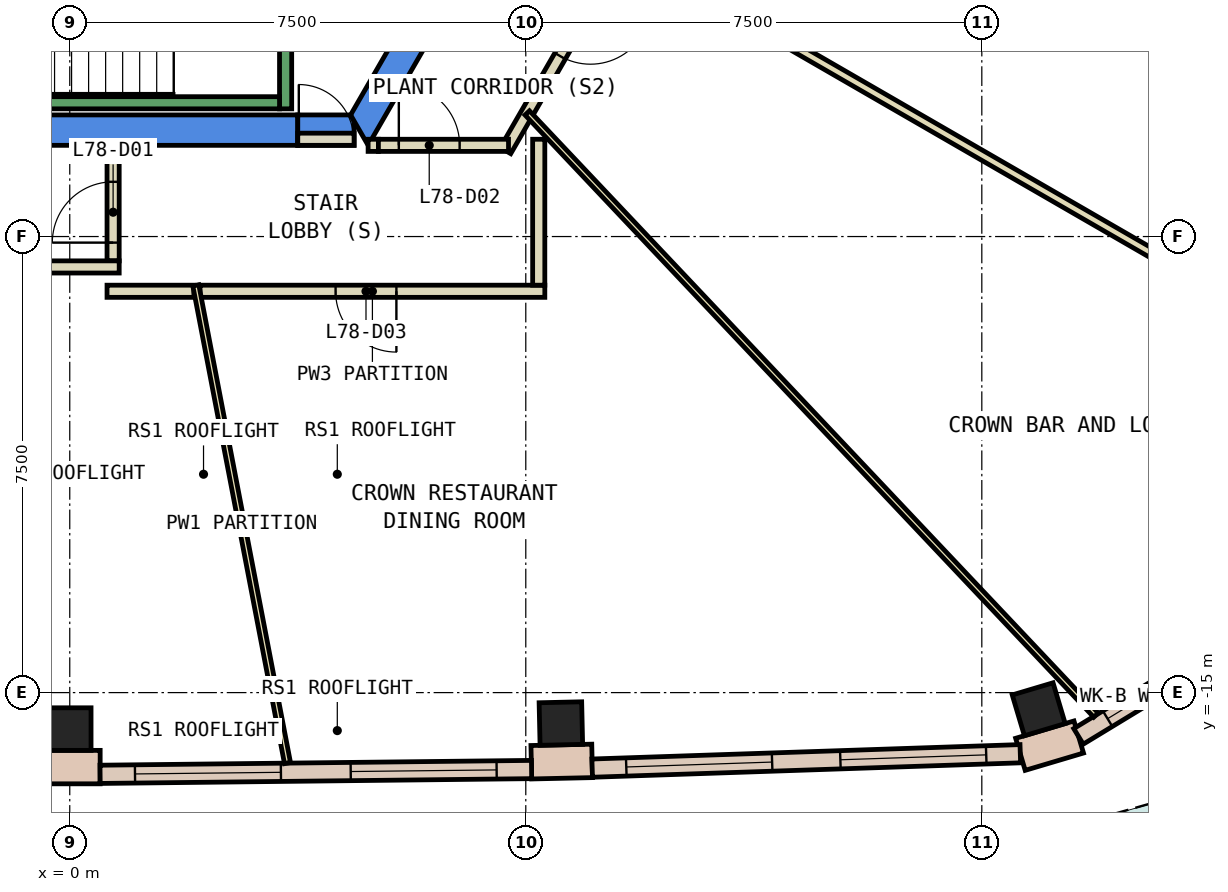
"""IFC4 building model, lengths in metres.
Left out: names, types, materials, properties, quantities, classifications, styles, units other than length and angle.
Written with IfcOpenShell. Run it as: python <this file> out.ifc"""

import sys

from ifc_helpers import new_model, si_unit, direction, frame, frame_2d, origin, origin_2d, place, context, subcontext, project, spatial, polyline, rectangle, outline, extrude, element, fill, save


model = new_model("IFC4")
c1 = context("Model", 3, precision=1e-05, world=origin(), true_north=direction((0.0, 1.0)))
c2 = subcontext(c1, "Body", "Model", "MODEL_VIEW")
j1 = project(units=[si_unit("LENGTHUNIT", "METRE"), si_unit("PLANEANGLEUNIT", "RADIAN")], contexts=[c1])
p1 = place(None, origin())
s1 = spatial("IfcSite", under=j1, at=p1, CompositionType="ELEMENT")
p2 = place(p1, origin())
s2 = spatial("IfcBuilding", under=s1, at=p2, CompositionType="ELEMENT")
p3 = place(p2, frame((0.0, 0.0, 331.4)))
s3 = spatial("IfcBuildingStorey", under=s2, at=p3, CompositionType="ELEMENT", Elevation=331.4)
for number, where, z_axis, x_axis in (
    (1, (0.0, -15.6, 0.0), (0.0, 0.0, 1.0), (1.0, 0.0, 0.0)),
    (2, (8.077, -15.509, 0.0), (0.0, 0.0, 1.0), (1.0, 0.022, 0.0)),
    (3, (15.936, -15.274, 0.0), (0.0, 0.0, 1.0), (0.958, 0.286, 0.0)),
):
    element("IfcColumn", number, at=place(p3, frame(where, z_axis=z_axis, x_axis=x_axis)), inside=s3, PredefinedType="COLUMN", context=c2, shape_type="SweptSolid", body=[
        extrude(rectangle(XDim=0.7, YDim=0.7, at=origin_2d()), origin(), (0.0, 0.0, 1.0), 4.15),
    ])
p4 = place(p3, frame((0.0, 0.0, -0.45)))
e4 = element("IfcWall", 4, at=p4, inside=s3, PredefinedType="SHEAR", context=c2, shape_type="SweptSolid", body=[
    extrude(outline(polyline([(3.75, -6.0), (3.75, -5.5), (-4.619, -5.5), (-4.907, -6.0), (3.75, -6.0)])), origin(), (0.0, 0.0, 1.0), 4.6),
])
p5 = place(p3, frame((0.0, 0.0, 3.6)))
e5 = element("IfcWall", 5, at=p5, inside=s3, PredefinedType="SHEAR", context=c2, shape_type="SweptSolid", body=[
    extrude(outline(polyline([(4.676, -6.0), (4.676, -5.6), (4.619, -5.5), (3.75, -5.5), (3.75, -6.0), (4.676, -6.0)])), origin(), (0.0, 0.0, 1.0), 0.55),
])
p6 = place(p3, frame((0.0, 0.0, -0.45)))
e6 = element("IfcWall", 6, at=p6, inside=s3, PredefinedType="SHEAR", context=c2, shape_type="SweptSolid", body=[
    extrude(outline(polyline([(4.907, -6.0), (9.815, 2.5), (9.238, 2.5), (4.619, -5.5), (4.907, -6.0)])), origin(), (0.0, 0.0, 1.0), 4.6),
])
p7 = place(p3, frame((-0.5, -16.225, 0.0), z_axis=(0.0, 0.0, 1.0), x_axis=(1.0, 0.0, 0.0)))
e7 = element("IfcWall", 7, at=p7, inside=s3, PredefinedType="STANDARD", context=c2, shape_type="SweptSolid", body=[
    extrude(rectangle(XDim=1.0, YDim=0.55, at=frame_2d((0.5, 0.0))), origin(), (0.0, 0.0, 1.0), 4.15),
])
p8 = place(p3, frame((7.591, -16.145, 0.0), z_axis=(0.0, 0.0, 1.0), x_axis=(0.999758688564, 0.021967353997, 0.0)))
e8 = element("IfcWall", 8, at=p8, inside=s3, PredefinedType="STANDARD", context=c2, shape_type="SweptSolid", body=[
    extrude(rectangle(XDim=1.0, YDim=0.55, at=frame_2d((0.5, 0.0))), origin(), (0.0, 0.0, 1.0), 4.15),
])
p9 = place(p3, frame((15.635, -16.015, 0.0), z_axis=(0.0, 0.0, 1.0), x_axis=(0.958588587629, 0.284794521834, 0.0)))
e9 = element("IfcWall", 9, at=p9, inside=s3, PredefinedType="STANDARD", context=c2, shape_type="SweptSolid", body=[
    extrude(rectangle(XDim=1.0, YDim=0.55, at=frame_2d((0.5, 0.0))), origin(), (0.0, 0.0, 1.0), 4.15),
])
p10 = place(p3, frame((0.499, -16.344, 0.0), z_axis=(0.0, 0.0, 1.0), x_axis=(0.999937873213, 0.011146735624, 0.0)))
e10 = element("IfcWall", 10, at=p10, inside=s3, PredefinedType="STANDARD", context=c2, shape_type="SweptSolid", body=[
    extrude(rectangle(XDim=7.096, YDim=0.3, at=frame_2d((3.548, 0.0))), origin(), (0.0, 0.0, 1.0), 4.15),
])
p11 = place(p10, frame((0.574, 0.0, 0.9)))
e11 = element("IfcOpeningElement", 11, at=p11, cuts=e10, PredefinedType="OPENING", context=c2, shape_type="SweptSolid", body=[
    extrude(rectangle(XDim=2.4, YDim=3.0, at=frame_2d((1.2, 1.5))), frame((0.0, 0.16, 0.0), z_axis=(0.0, -1.0, 0.0), x_axis=(1.0, 0.0, 0.0)), (0.0, 0.0, 1.0), 0.32),
])
p12 = place(p10, frame((4.122, 0.0, 0.9)))
e12 = element("IfcOpeningElement", 12, at=p12, cuts=e10, PredefinedType="OPENING", context=c2, shape_type="SweptSolid", body=[
    extrude(rectangle(XDim=2.4, YDim=3.0, at=frame_2d((1.2, 1.5))), frame((0.0, 0.16, 0.0), z_axis=(0.0, -1.0, 0.0), x_axis=(1.0, 0.0, 0.0)), (0.0, 0.0, 1.0), 0.32),
])
p13 = place(p3, frame((8.592, -16.242, 0.0), z_axis=(0.0, 0.0, 1.0), x_axis=(0.999433696929, 0.033649449366, 0.0)))
e13 = element("IfcWall", 13, at=p13, inside=s3, PredefinedType="STANDARD", context=c2, shape_type="SweptSolid", body=[
    extrude(rectangle(XDim=7.045, YDim=0.3, at=frame_2d((3.522, 0.0))), origin(), (0.0, 0.0, 1.0), 4.15),
])
p14 = place(p13, frame((0.561, 0.0, 0.9)))
e14 = element("IfcOpeningElement", 14, at=p14, cuts=e13, PredefinedType="OPENING", context=c2, shape_type="SweptSolid", body=[
    extrude(rectangle(XDim=2.4, YDim=3.0, at=frame_2d((1.2, 1.5))), frame((0.0, 0.16, 0.0), z_axis=(0.0, -1.0, 0.0), x_axis=(1.0, 0.0, 0.0)), (0.0, 0.0, 1.0), 0.32),
])
p15 = place(p13, frame((4.084, 0.0, 0.9)))
e15 = element("IfcOpeningElement", 15, at=p15, cuts=e13, PredefinedType="OPENING", context=c2, shape_type="SweptSolid", body=[
    extrude(rectangle(XDim=2.4, YDim=3.0, at=frame_2d((1.2, 1.5))), frame((0.0, 0.16, 0.0), z_axis=(0.0, -1.0, 0.0), x_axis=(1.0, 0.0, 0.0)), (0.0, 0.0, 1.0), 0.32),
])
p16 = place(p3, frame((16.59, -15.72, 0.0), z_axis=(0.0, 0.0, 1.0), x_axis=(0.854607095238, 0.519275180197, 0.0)))
e16 = element("IfcWall", 16, at=p16, inside=s3, PredefinedType="STANDARD", context=c2, shape_type="SweptSolid", body=[
    extrude(rectangle(XDim=5.04, YDim=0.3, at=frame_2d((2.52, 0.0))), origin(), (0.0, 0.0, 1.0), 4.15),
])
p17 = place(p16, frame((0.56, 0.0, 0.9)))
e17 = element("IfcOpeningElement", 17, at=p17, cuts=e16, PredefinedType="OPENING", context=c2, shape_type="SweptSolid", body=[
    extrude(rectangle(XDim=1.4, YDim=3.0, at=frame_2d((0.7, 1.5))), frame((0.0, 0.16, 0.0), z_axis=(0.0, -1.0, 0.0), x_axis=(1.0, 0.0, 0.0)), (0.0, 0.0, 1.0), 0.32),
])
p18 = place(p16, frame((3.08, 0.0, 0.9)))
e18 = element("IfcOpeningElement", 18, at=p18, cuts=e16, PredefinedType="OPENING", context=c2, shape_type="SweptSolid", body=[
    extrude(rectangle(XDim=1.4, YDim=3.0, at=frame_2d((0.7, 1.5))), frame((0.0, 0.16, 0.0), z_axis=(0.0, -1.0, 0.0), x_axis=(1.0, 0.0, 0.0)), (0.0, 0.0, 1.0), 0.32),
])
p19 = place(p3, frame((0.713, -7.9, 0.0), z_axis=(0.0, 0.0, 1.0), x_axis=(0.0, 1.0, 0.0)))
e19 = element("IfcWall", 19, at=p19, inside=s3, PredefinedType="PARTITIONING", context=c2, shape_type="SweptSolid", body=[
    extrude(rectangle(XDim=1.9, YDim=0.2, at=frame_2d((0.95, 0.0))), origin(), (0.0, 0.0, 1.0), 4.15),
])
p20 = place(p19, frame((0.3, 0.0, 0.0)))
e20 = element("IfcOpeningElement", 20, at=p20, cuts=e19, PredefinedType="OPENING", context=c2, shape_type="SweptSolid", body=[
    extrude(rectangle(XDim=1.0, YDim=2.1, at=frame_2d((0.5, 1.05))), frame((0.0, 0.11, 0.0), z_axis=(0.0, -1.0, 0.0), x_axis=(1.0, 0.0, 0.0)), (0.0, 0.0, 1.0), 0.22),
])
p21 = place(p3, frame((4.907, -6.0, 0.0), z_axis=(0.0, 0.0, 1.0), x_axis=(1.0, 0.0, 0.0)))
e21 = element("IfcWall", 21, at=p21, inside=s3, PredefinedType="PARTITIONING", context=c2, shape_type="SweptSolid", body=[
    extrude(rectangle(XDim=0.169, YDim=0.2, at=frame_2d((0.084, 0.0))), origin(), (0.0, 0.0, 1.0), 2.4),
])
p22 = place(p3, frame((7.813, -8.4, 0.0), z_axis=(0.0, 0.0, 1.0), x_axis=(-1.0, 0.0, 0.0)))
e22 = element("IfcWall", 22, at=p22, inside=s3, PredefinedType="PARTITIONING", context=c2, shape_type="SweptSolid", body=[
    extrude(rectangle(XDim=5.671, YDim=0.2, at=frame_2d((2.835, 0.0))), origin(), (0.0, 0.0, 1.0), 4.15),
])
p23 = place(p22, frame((2.441, 0.0, 0.0)))
e23 = element("IfcOpeningElement", 23, at=p23, cuts=e22, PredefinedType="OPENING", context=c2, shape_type="SweptSolid", body=[
    extrude(rectangle(XDim=1.0, YDim=2.1, at=frame_2d((0.5, 1.05))), frame((0.0, 0.11, 0.0), z_axis=(0.0, -1.0, 0.0), x_axis=(1.0, 0.0, 0.0)), (0.0, 0.0, 1.0), 0.22),
])
p24 = place(p3, frame((7.713, -5.9, 0.0), z_axis=(0.0, 0.0, 1.0), x_axis=(0.0, -1.0, 0.0)))
e24 = element("IfcWall", 24, at=p24, inside=s3, PredefinedType="PARTITIONING", context=c2, shape_type="SweptSolid", body=[
    extrude(rectangle(XDim=2.4, YDim=0.2, at=frame_2d((1.2, 0.0))), origin(), (0.0, 0.0, 1.0), 4.15),
])
p25 = place(p3, frame((2.042, -8.4, 0.0), z_axis=(0.0, 0.0, 1.0), x_axis=(-1.0, 0.0, 0.0)))
e25 = element("IfcWall", 25, at=p25, inside=s3, PredefinedType="PARTITIONING", context=c2, shape_type="SweptSolid", body=[
    extrude(rectangle(XDim=1.429, YDim=0.2, at=frame_2d((0.714, 0.0))), origin(), (0.0, 0.0, 1.0), 4.15),
])
p26 = place(p3, frame((0.813, -8.0, 0.0), z_axis=(0.0, 0.0, 1.0), x_axis=(-1.0, 0.0, 0.0)))
e26 = element("IfcWall", 26, at=p26, inside=s3, PredefinedType="PARTITIONING", context=c2, shape_type="SweptSolid", body=[
    extrude(rectangle(XDim=6.975, YDim=0.2, at=frame_2d((3.488, 0.0))), origin(), (0.0, 0.0, 1.0), 4.15),
])
p27 = place(p26, frame((5.825, 0.0, 0.0)))
e27 = element("IfcOpeningElement", 27, at=p27, cuts=e26, PredefinedType="OPENING", context=c2, shape_type="SweptSolid", body=[
    extrude(rectangle(XDim=1.0, YDim=2.1, at=frame_2d((0.5, 1.05))), frame((0.0, 0.11, 0.0), z_axis=(0.0, -1.0, 0.0), x_axis=(1.0, 0.0, 0.0)), (0.0, 0.0, 1.0), 0.22),
])
p28 = place(p3, frame((9.106, -2.728, 0.0), z_axis=(0.0, 0.0, 1.0), x_axis=(-0.500132879116, -0.865948672398, 0.0)))
e28 = element("IfcWall", 28, at=p28, inside=s3, PredefinedType="PARTITIONING", context=c2, shape_type="SweptSolid", body=[
    extrude(rectangle(XDim=3.879, YDim=0.2, at=frame_2d((1.939, 0.0))), origin(), (0.0, 0.0, 1.0), 4.15),
])
p29 = place(p28, frame((1.083, 0.0, 0.0)))
e29 = element("IfcOpeningElement", 29, at=p29, cuts=e28, PredefinedType="OPENING", context=c2, shape_type="SweptSolid", body=[
    extrude(rectangle(XDim=1.0, YDim=2.1, at=frame_2d((0.5, 1.05))), frame((0.0, 0.11, 0.0), z_axis=(0.0, -1.0, 0.0), x_axis=(1.0, 0.0, 0.0)), (0.0, 0.0, 1.0), 0.22),
])
p30 = place(p3, frame((3.581, -16.159, 0.0), z_axis=(0.0, 0.0, 1.0), x_axis=(-0.188498774051, 0.982073425046, 0.0)))
e30 = element("IfcWall", 30, at=p30, inside=s3, PredefinedType="PARTITIONING", context=c2, shape_type="SweptSolid", body=[
    extrude(rectangle(XDim=8.0, YDim=0.1, at=frame_2d((4.0, 0.0))), origin(), (0.0, 0.0, 1.0), 4.15),
])
p31 = place(p3, frame((7.524, -5.467, 0.0), z_axis=(0.0, 0.0, 1.0), x_axis=(0.686666158826, -0.726972892427, 0.0)))
e31 = element("IfcWall", 31, at=p31, inside=s3, PredefinedType="PARTITIONING", context=c2, shape_type="SweptSolid", body=[
    extrude(rectangle(XDim=13.622, YDim=0.1, at=frame_2d((6.811, 0.0))), origin(), (0.0, 0.0, 1.0), 4.15),
])
p32 = place(p3, frame((9.006, -2.7, 0.0), z_axis=(0.0, 0.0, 1.0), x_axis=(0.865999449672, -0.500044951147, 0.0)))
e32 = element("IfcWall", 32, at=p32, inside=s3, PredefinedType="PARTITIONING", context=c2, shape_type="SweptSolid", body=[
    extrude(rectangle(XDim=14.635, YDim=0.15, at=frame_2d((7.317, 0.0))), origin(), (0.0, 0.0, 1.0), 4.15),
])
p33 = place(p3, frame((3.75, -5.9, 0.0), z_axis=(0.0, 0.0, 1.0), x_axis=(1.0, 0.0, 0.0)))
e33 = element("IfcWall", 33, at=p33, inside=s3, PredefinedType="PARTITIONING", context=c2, shape_type="SweptSolid", body=[
    extrude(rectangle(XDim=0.926, YDim=0.2, at=frame_2d((0.463, 0.0))), origin(), (0.0, 0.0, 1.0), 2.4),
])
p34 = place(p33, frame((0.017, 0.0, 0.0)))
e34 = element("IfcOpeningElement", 34, at=p34, cuts=e33, PredefinedType="OPENING", context=c2, shape_type="SweptSolid", body=[
    extrude(rectangle(XDim=0.9, YDim=2.1, at=frame_2d((0.45, 1.05))), frame((0.0, 0.11, 0.0), z_axis=(0.0, -1.0, 0.0), x_axis=(1.0, 0.0, 0.0)), (0.0, 0.0, 1.0), 0.22),
])
p35 = place(p3, frame((5.076, -6.0, 0.0), z_axis=(0.0, 0.0, 1.0), x_axis=(1.0, 0.0, 0.0)))
e35 = element("IfcWall", 35, at=p35, inside=s3, PredefinedType="PARTITIONING", context=c2, shape_type="SweptSolid", body=[
    extrude(rectangle(XDim=2.14, YDim=0.2, at=frame_2d((1.07, 0.0))), origin(), (0.0, 0.0, 1.0), 4.15),
])
p36 = place(p35, frame((0.336, 0.0, 0.0)))
e36 = element("IfcOpeningElement", 36, at=p36, cuts=e35, PredefinedType="OPENING", context=c2, shape_type="SweptSolid", body=[
    extrude(rectangle(XDim=1.0, YDim=2.1, at=frame_2d((0.5, 1.05))), frame((0.0, 0.11, 0.0), z_axis=(0.0, -1.0, 0.0), x_axis=(1.0, 0.0, 0.0)), (0.0, 0.0, 1.0), 0.22),
])
p37 = place(p3, frame((3.55, -2.667, 0.0), z_axis=(0.0, 0.0, 1.0), x_axis=(0.0, -1.0, 0.0)))
e37 = element("IfcWall", 37, at=p37, inside=s3, PredefinedType="STANDARD", context=c2, shape_type="SweptSolid", body=[
    extrude(rectangle(XDim=2.733, YDim=0.2, at=frame_2d((1.366, 0.0))), origin(), (0.0, 0.0, 1.0), 4.15),
])
p38 = place(p3, frame((-3.45, -5.3, 0.0), z_axis=(0.0, 0.0, 1.0), x_axis=(1.0, 0.0, 0.0)))
e38 = element("IfcWall", 38, at=p38, inside=s3, PredefinedType="STANDARD", context=c2, shape_type="SweptSolid", body=[
    extrude(rectangle(XDim=6.9, YDim=0.2, at=frame_2d((3.45, 0.0))), origin(), (0.0, 0.0, 1.0), 4.15),
])
p39 = place(p11, origin())
e39 = element("IfcWindow", 39, at=p39, inside=s3, PartitioningType="SINGLE_PANEL", PredefinedType="WINDOW", context=c2, shape_type="SweptSolid", body=[
    extrude(rectangle(XDim=2.4, YDim=3.0, at=frame_2d((1.2, 1.5))), frame((0.0, 0.03, 0.0), z_axis=(0.0, -1.0, 0.0), x_axis=(1.0, 0.0, 0.0)), (0.0, 0.0, 1.0), 0.06),
])
fill(e11, e39)
p40 = place(p12, origin())
e40 = element("IfcWindow", 40, at=p40, inside=s3, PartitioningType="SINGLE_PANEL", PredefinedType="WINDOW", context=c2, shape_type="SweptSolid", body=[
    extrude(rectangle(XDim=2.4, YDim=3.0, at=frame_2d((1.2, 1.5))), frame((0.0, 0.03, 0.0), z_axis=(0.0, -1.0, 0.0), x_axis=(1.0, 0.0, 0.0)), (0.0, 0.0, 1.0), 0.06),
])
fill(e12, e40)
p41 = place(p14, origin())
e41 = element("IfcWindow", 41, at=p41, inside=s3, PartitioningType="SINGLE_PANEL", PredefinedType="WINDOW", context=c2, shape_type="SweptSolid", body=[
    extrude(rectangle(XDim=2.4, YDim=3.0, at=frame_2d((1.2, 1.5))), frame((0.0, 0.03, 0.0), z_axis=(0.0, -1.0, 0.0), x_axis=(1.0, 0.0, 0.0)), (0.0, 0.0, 1.0), 0.06),
])
fill(e14, e41)
p42 = place(p15, origin())
e42 = element("IfcWindow", 42, at=p42, inside=s3, PartitioningType="SINGLE_PANEL", PredefinedType="WINDOW", context=c2, shape_type="SweptSolid", body=[
    extrude(rectangle(XDim=2.4, YDim=3.0, at=frame_2d((1.2, 1.5))), frame((0.0, 0.03, 0.0), z_axis=(0.0, -1.0, 0.0), x_axis=(1.0, 0.0, 0.0)), (0.0, 0.0, 1.0), 0.06),
])
fill(e15, e42)
p43 = place(p17, origin())
e43 = element("IfcWindow", 43, at=p43, inside=s3, PartitioningType="SINGLE_PANEL", PredefinedType="WINDOW", context=c2, shape_type="SweptSolid", body=[
    extrude(rectangle(XDim=1.4, YDim=3.0, at=frame_2d((0.7, 1.5))), frame((0.0, 0.03, 0.0), z_axis=(0.0, -1.0, 0.0), x_axis=(1.0, 0.0, 0.0)), (0.0, 0.0, 1.0), 0.06),
])
fill(e17, e43)
p44 = place(p3, frame((0.0, 0.0, -0.45)))
p45 = place(p44, frame((2.2, -15.625, 0.0)))
p46 = place(p45, frame((0.0, 0.0, 0.4)))
e44 = element("IfcWindow", 44, at=p46, inside=s3, PartitioningType="SINGLE_PANEL", PredefinedType="SKYLIGHT", context=c2, shape_type="SweptSolid", body=[
    extrude(rectangle(XDim=2.0, YDim=3.217, at=origin_2d()), origin(), (0.0, 0.0, 1.0), 0.05),
])
p47 = place(p44, frame((4.4, -15.625, 0.0)))
p48 = place(p47, frame((0.0, 0.0, 0.4)))
e45 = element("IfcWindow", 45, at=p48, inside=s3, PartitioningType="SINGLE_PANEL", PredefinedType="SKYLIGHT", context=c2, shape_type="SweptSolid", body=[
    extrude(rectangle(XDim=2.0, YDim=3.217, at=origin_2d()), origin(), (0.0, 0.0, 1.0), 0.05),
])
p49 = place(p44, frame((0.0, -11.409, 0.0)))
p50 = place(p49, frame((0.0, 0.0, 0.4)))
e46 = element("IfcWindow", 46, at=p50, inside=s3, PartitioningType="SINGLE_PANEL", PredefinedType="SKYLIGHT", context=c2, shape_type="SweptSolid", body=[
    extrude(rectangle(XDim=2.0, YDim=3.217, at=origin_2d()), origin(), (0.0, 0.0, 1.0), 0.05),
])
p51 = place(p44, frame((2.2, -11.409, 0.0)))
p52 = place(p51, frame((0.0, 0.0, 0.4)))
e47 = element("IfcWindow", 47, at=p52, inside=s3, PartitioningType="SINGLE_PANEL", PredefinedType="SKYLIGHT", context=c2, shape_type="SweptSolid", body=[
    extrude(rectangle(XDim=2.0, YDim=3.217, at=origin_2d()), origin(), (0.0, 0.0, 1.0), 0.05),
])
p53 = place(p44, frame((4.4, -11.409, 0.0)))
p54 = place(p53, frame((0.0, 0.0, 0.4)))
e48 = element("IfcWindow", 48, at=p54, inside=s3, PartitioningType="SINGLE_PANEL", PredefinedType="SKYLIGHT", context=c2, shape_type="SweptSolid", body=[
    extrude(rectangle(XDim=2.0, YDim=3.217, at=origin_2d()), origin(), (0.0, 0.0, 1.0), 0.05),
])
p55 = place(p20, origin())
e49 = element("IfcDoor", 49, at=p55, inside=s3, OperationType="SINGLE_SWING_LEFT", PredefinedType="DOOR", context=c2, shape_type="SweptSolid", body=[
    extrude(rectangle(XDim=1.0, YDim=2.1, at=frame_2d((0.5, 1.05))), frame((0.0, 0.025, 0.0), z_axis=(0.0, -1.0, 0.0), x_axis=(1.0, 0.0, 0.0)), (0.0, 0.0, 1.0), 0.05),
])
fill(e20, e49)
p56 = place(p36, origin())
e50 = element("IfcDoor", 50, at=p56, inside=s3, OperationType="SINGLE_SWING_RIGHT", PredefinedType="DOOR", context=c2, shape_type="SweptSolid", body=[
    extrude(rectangle(XDim=1.0, YDim=2.1, at=frame_2d((0.5, 1.05))), frame((0.0, 0.025, 0.0), z_axis=(0.0, -1.0, 0.0), x_axis=(1.0, 0.0, 0.0)), (0.0, 0.0, 1.0), 0.05),
])
fill(e36, e50)
p57 = place(p23, origin())
e51 = element("IfcDoor", 51, at=p57, inside=s3, OperationType="SINGLE_SWING_LEFT", PredefinedType="DOOR", context=c2, shape_type="SweptSolid", body=[
    extrude(rectangle(XDim=1.0, YDim=2.1, at=frame_2d((0.5, 1.05))), frame((0.0, 0.025, 0.0), z_axis=(0.0, -1.0, 0.0), x_axis=(1.0, 0.0, 0.0)), (0.0, 0.0, 1.0), 0.05),
])
fill(e23, e51)
p58 = place(p29, origin())
e52 = element("IfcDoor", 52, at=p58, inside=s3, OperationType="SINGLE_SWING_LEFT", PredefinedType="DOOR", context=c2, shape_type="SweptSolid", body=[
    extrude(rectangle(XDim=1.0, YDim=2.1, at=frame_2d((0.5, 1.05))), frame((0.0, 0.025, 0.0), z_axis=(0.0, -1.0, 0.0), x_axis=(1.0, 0.0, 0.0)), (0.0, 0.0, 1.0), 0.05),
])
fill(e29, e52)
p59 = place(p34, origin())
e53 = element("IfcDoor", 53, at=p59, inside=s3, OperationType="SINGLE_SWING_LEFT", PredefinedType="DOOR", context=c2, shape_type="SweptSolid", body=[
    extrude(rectangle(XDim=0.9, YDim=2.1, at=frame_2d((0.45, 1.05))), frame((0.0, 0.025, 0.0), z_axis=(0.0, -1.0, 0.0), x_axis=(1.0, 0.0, 0.0)), (0.0, 0.0, 1.0), 0.05),
])
fill(e34, e53)
save(model, sys.argv[1])
